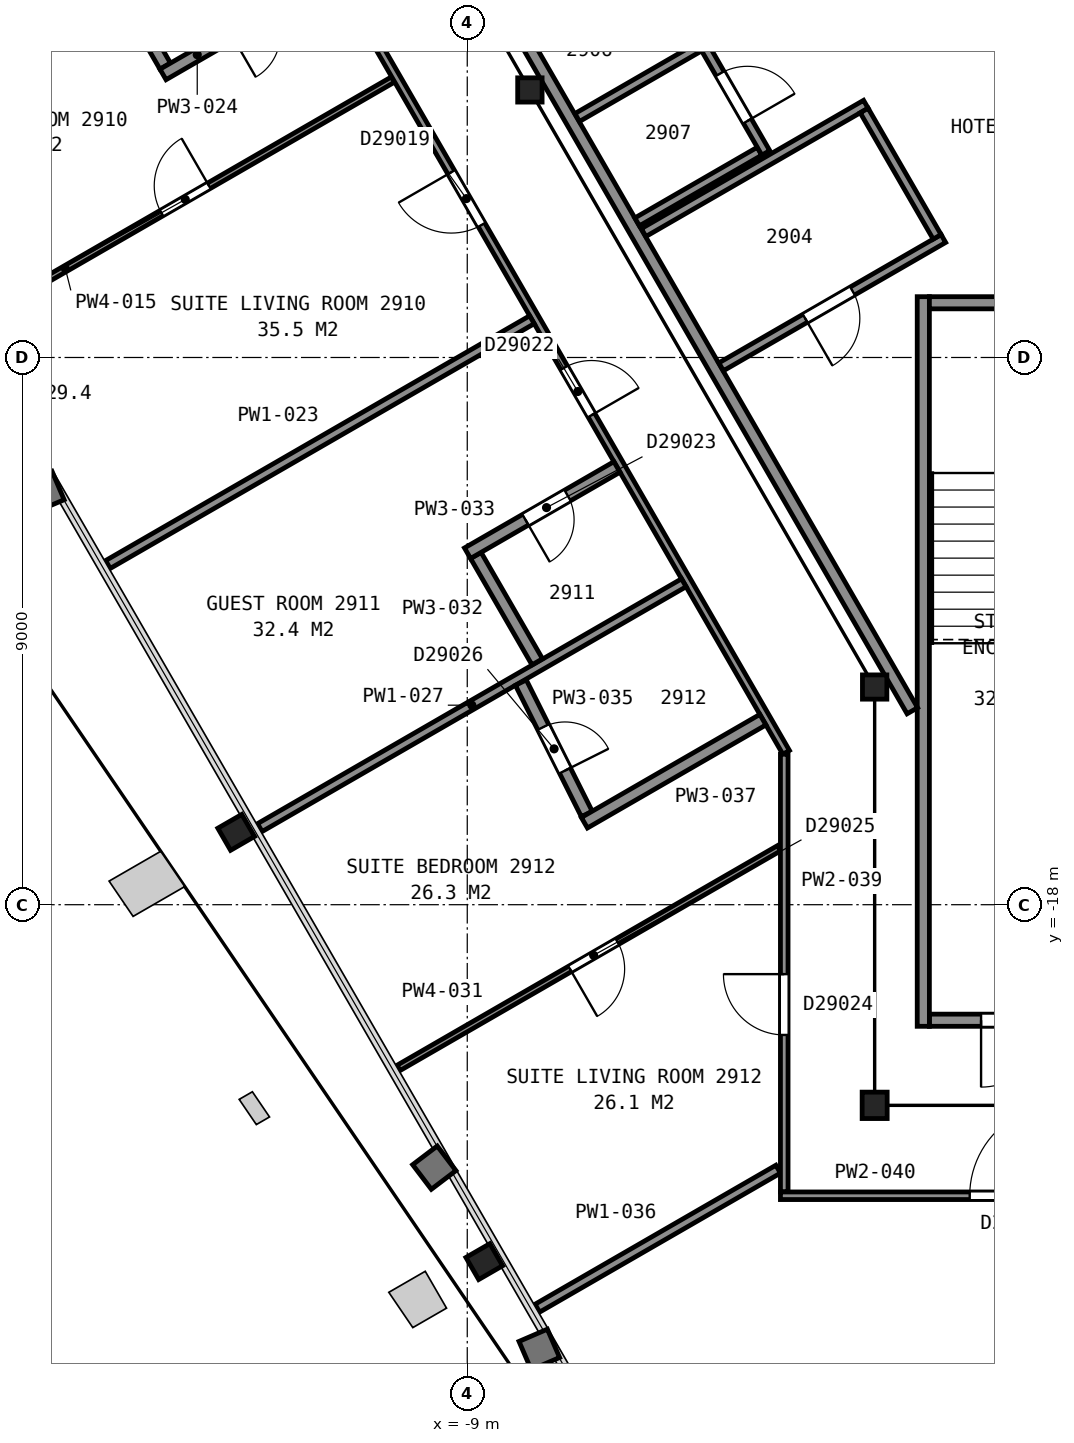
"""IFC4 building model, lengths in metres.
Left out: names, types, materials, properties, quantities, classifications, styles, units other than length and angle.
Written with IfcOpenShell. Run it as: python <this file> out.ifc"""

import sys

from ifc_helpers import new_model, si_unit, direction, frame, frame_2d, origin, origin_2d, place, context, subcontext, project, spatial, rectangle, i_section, extrude, element, fill, save


model = new_model("IFC4")
c1 = context("Model", 3, precision=1e-05, world=origin(), true_north=direction((0.0, 1.0)))
c2 = subcontext(c1, "Body", "Model", "MODEL_VIEW")
j1 = project(units=[si_unit("LENGTHUNIT", "METRE"), si_unit("PLANEANGLEUNIT", "RADIAN")], contexts=[c1])
p1 = place(None, origin())
s1 = spatial("IfcSite", under=j1, at=p1, CompositionType="ELEMENT")
p2 = place(p1, origin())
s2 = spatial("IfcBuilding", under=s1, at=p2, CompositionType="ELEMENT")
p3 = place(p2, frame((0.0, 0.0, 121.6)))
s3 = spatial("IfcBuildingStorey", under=s2, at=p3, CompositionType="ELEMENT", Elevation=121.6)
p4 = place(p3, frame((-12.8, -16.81, 0.04), z_axis=(0.0, 0.0, 1.0), x_axis=(-0.5, 0.866025403784, 0.0)))
e1 = element("IfcColumn", 1, at=p4, inside=s3, PredefinedType="COLUMN", context=c2, shape_type="SweptSolid", body=[
    extrude(i_section(OverallWidth=0.419, OverallDepth=0.455, WebThickness=0.042, FlangeThickness=0.068, FilletRadius=0.015, at=origin_2d()), origin(), (0.0, 0.0, 1.0), 3.56),
])
p5 = place(p3, frame((-8.72, -23.87, 0.045), z_axis=(0.0, 0.0, 1.0), x_axis=(-0.5, 0.866025403784, 0.0)))
e2 = element("IfcColumn", 2, at=p5, inside=s3, PredefinedType="COLUMN", context=c2, shape_type="SweptSolid", body=[
    extrude(i_section(OverallWidth=0.419, OverallDepth=0.455, WebThickness=0.042, FlangeThickness=0.068, FilletRadius=0.015, at=origin_2d()), origin(), (0.0, 0.0, 1.0), 3.555),
])
for number, where, z_axis, x_axis in (
    (3, (-7.97, -4.6, 0.0), (0.0, 0.0, 1.0), (1.0, 0.0, 0.0)),
    (4, (-2.3, -14.42, 0.0), (0.0, 0.0, 1.0), (1.0, 0.0, 0.0)),
):
    element("IfcColumn", number, at=place(p3, frame(where, z_axis=z_axis, x_axis=x_axis)), inside=s3, PredefinedType="COLUMN", context=c2, shape_type="SweptSolid", body=[
        extrude(i_section(OverallWidth=0.401, OverallDepth=0.399, WebThickness=0.025, FlangeThickness=0.04, FilletRadius=0.015, at=origin_2d()), origin(), (0.0, 0.0, 1.0), 3.6),
    ])
p6 = place(p3, frame((-2.3, -21.3, 0.0), z_axis=(0.0, 0.0, 1.0), x_axis=(-1.0, 0.0, 0.0)))
e5 = element("IfcColumn", 5, at=p6, inside=s3, PredefinedType="COLUMN", context=c2, shape_type="SweptSolid", body=[
    extrude(i_section(OverallWidth=0.411, OverallDepth=0.434, WebThickness=0.036, FlangeThickness=0.057, FilletRadius=0.015, at=origin_2d()), origin(), (0.0, 0.0, 1.0), 3.6),
])
p7 = place(p3, frame((-1.4, -19.9, 0.0), z_axis=(0.0, 0.0, 1.0), x_axis=(1.0, 0.0, 0.0)))
e6 = element("IfcWall", 6, at=p7, inside=s3, PredefinedType="PARTITIONING", context=c2, shape_type="SweptSolid", body=[
    extrude(rectangle(XDim=2.8, YDim=0.2, at=frame_2d((1.4, 0.0))), origin(), (0.0, 0.0, 1.0), 3.35),
])
p8 = place(p7, frame((0.85, 0.0, 0.0)))
e7 = element("IfcOpeningElement", 7, at=p8, cuts=e6, PredefinedType="OPENING", context=c2, shape_type="SweptSolid", body=[
    extrude(rectangle(XDim=1.1, YDim=2.1, at=frame_2d((0.55, 1.05))), frame((0.0, 0.11, 0.0), z_axis=(0.0, -1.0, 0.0), x_axis=(1.0, 0.0, 0.0)), (0.0, 0.0, 1.0), 0.22),
])
p9 = place(p3, frame((-1.5, -8.0, 0.0), z_axis=(0.0, 0.0, 1.0), x_axis=(0.0, -1.0, 0.0)))
e8 = element("IfcWall", 8, at=p9, inside=s3, PredefinedType="PARTITIONING", context=c2, shape_type="SweptSolid", body=[
    extrude(rectangle(XDim=12.0, YDim=0.2, at=frame_2d((6.0, 0.0))), origin(), (0.0, 0.0, 1.0), 3.35),
])
p10 = place(p3, frame((-1.4, -8.1, 0.0), z_axis=(0.0, 0.0, 1.0), x_axis=(1.0, 0.0, 0.0)))
e9 = element("IfcWall", 9, at=p10, inside=s3, PredefinedType="PARTITIONING", context=c2, shape_type="SweptSolid", body=[
    extrude(rectangle(XDim=2.8, YDim=0.2, at=frame_2d((1.4, 0.0))), origin(), (0.0, 0.0, 1.0), 3.35),
])
p11 = place(p3, frame((-13.664, 5.946, 0.0), z_axis=(0.0, 0.0, 1.0), x_axis=(0.499994327219, -0.866028678941, 0.0)))
e10 = element("IfcWall", 10, at=p11, inside=s3, PredefinedType="PARTITIONING", context=c2, shape_type="SweptSolid", body=[
    extrude(rectangle(XDim=23.968, YDim=0.2, at=frame_2d((11.984, 0.0))), origin(), (0.0, 0.0, 1.0), 3.35),
])
p12 = place(p3, frame((-7.192, -5.053, 0.0), z_axis=(0.0, 0.0, 1.0), x_axis=(0.865851878631, 0.500300434011, 0.0)))
e11 = element("IfcWall", 11, at=p12, inside=s3, PredefinedType="PARTITIONING", context=c2, shape_type="SweptSolid", body=[
    extrude(rectangle(XDim=2.315, YDim=0.15, at=frame_2d((1.158, 0.0))), origin(), (0.0, 0.0, 1.0), 3.35),
])
p13 = place(p3, frame((-6.206, -6.77, 0.0), z_axis=(0.0, 0.0, 1.0), x_axis=(0.865998469481, 0.500046648681, 0.0)))
e12 = element("IfcWall", 12, at=p13, inside=s3, PredefinedType="PARTITIONING", context=c2, shape_type="SweptSolid", body=[
    extrude(rectangle(XDim=2.325, YDim=0.15, at=frame_2d((1.163, 0.0))), origin(), (0.0, 0.0, 1.0), 3.35),
])
p14 = place(p3, frame((-6.1, -6.946, 0.0), z_axis=(0.0, 0.0, 1.0), x_axis=(0.866038200431, 0.499977834903, 0.0)))
e13 = element("IfcWall", 13, at=p14, inside=s3, PredefinedType="PARTITIONING", context=c2, shape_type="SweptSolid", body=[
    extrude(rectangle(XDim=4.22, YDim=0.15, at=frame_2d((2.11, 0.0))), origin(), (0.0, 0.0, 1.0), 3.35),
])
p15 = place(p3, frame((-4.091, -5.635, 0.0), z_axis=(0.0, 0.0, 1.0), x_axis=(-0.499948934428, 0.866054884499, 0.0)))
e14 = element("IfcWall", 14, at=p15, inside=s3, PredefinedType="PARTITIONING", context=c2, shape_type="SweptSolid", body=[
    extrude(rectangle(XDim=3.577, YDim=0.15, at=frame_2d((1.789, 0.0))), origin(), (0.0, 0.0, 1.0), 3.35),
])
p16 = place(p15, frame((2.377, 0.0, 0.0)))
e15 = element("IfcOpeningElement", 15, at=p16, cuts=e14, PredefinedType="OPENING", context=c2, shape_type="SweptSolid", body=[
    extrude(rectangle(XDim=0.9, YDim=2.1, at=frame_2d((0.45, 1.05))), frame((0.0, 0.085, 0.0), z_axis=(0.0, -1.0, 0.0), x_axis=(1.0, 0.0, 0.0)), (0.0, 0.0, 1.0), 0.17),
])
p17 = place(p15, frame((0.605, 0.0, 0.0)))
e16 = element("IfcOpeningElement", 16, at=p17, cuts=e14, PredefinedType="OPENING", context=c2, shape_type="SweptSolid", body=[
    extrude(rectangle(XDim=0.9, YDim=2.1, at=frame_2d((0.45, 1.05))), frame((0.0, 0.085, 0.0), z_axis=(0.0, -1.0, 0.0), x_axis=(1.0, 0.0, 0.0)), (0.0, 0.0, 1.0), 0.17),
])
p18 = place(p3, frame((-4.825, -9.154, 0.0), z_axis=(0.0, 0.0, 1.0), x_axis=(0.866023738697, 0.500002884005, 0.0)))
e17 = element("IfcWall", 17, at=p18, inside=s3, PredefinedType="PARTITIONING", context=c2, shape_type="SweptSolid", body=[
    extrude(rectangle(XDim=4.22, YDim=0.15, at=frame_2d((2.11, 0.0))), origin(), (0.0, 0.0, 1.0), 3.35),
])
p19 = place(p18, frame((1.595, 0.0, 0.0)))
e18 = element("IfcOpeningElement", 18, at=p19, cuts=e17, PredefinedType="OPENING", context=c2, shape_type="SweptSolid", body=[
    extrude(rectangle(XDim=0.9, YDim=2.1, at=frame_2d((0.45, 1.05))), frame((0.0, 0.085, 0.0), z_axis=(0.0, -1.0, 0.0), x_axis=(1.0, 0.0, 0.0)), (0.0, 0.0, 1.0), 0.17),
])
p20 = place(p3, frame((-2.472, -4.938, 0.0), z_axis=(0.0, 0.0, 1.0), x_axis=(0.500045362686, -0.865999212041, 0.0)))
e19 = element("IfcWall", 19, at=p20, inside=s3, PredefinedType="PARTITIONING", context=c2, shape_type="SweptSolid", body=[
    extrude(rectangle(XDim=2.4, YDim=0.15, at=frame_2d((1.2, 0.0))), origin(), (0.0, 0.0, 1.0), 3.35),
])
p21 = place(p3, frame((-19.473, -4.501, 0.0), z_axis=(0.0, 0.0, 1.0), x_axis=(0.866005217449, 0.50003496213, 0.0)))
e20 = element("IfcWall", 20, at=p21, inside=s3, PredefinedType="PARTITIONING", context=c2, shape_type="SweptSolid", body=[
    extrude(rectangle(XDim=8.047, YDim=0.15, at=frame_2d((4.024, 0.0))), origin(), (0.0, 0.0, 1.0), 2.613),
])
p22 = place(p3, frame((-17.192, -8.453, 0.0), z_axis=(0.0, 0.0, 1.0), x_axis=(0.865999665789, 0.500044576866, 0.0)))
e21 = element("IfcWall", 21, at=p22, inside=s3, PredefinedType="PARTITIONING", context=c2, shape_type="SweptSolid", body=[
    extrude(rectangle(XDim=8.048, YDim=0.1, at=frame_2d((4.024, 0.0))), origin(), (0.0, 0.0, 1.0), 2.613),
])
p23 = place(p22, frame((3.654, 0.0, 0.0)))
e22 = element("IfcOpeningElement", 22, at=p23, cuts=e21, PredefinedType="OPENING", context=c2, shape_type="SweptSolid", body=[
    extrude(rectangle(XDim=0.9, YDim=2.1, at=frame_2d((0.45, 1.05))), frame((0.0, 0.06, 0.0), z_axis=(0.0, -1.0, 0.0), x_axis=(1.0, 0.0, 0.0)), (0.0, 0.0, 1.0), 0.12),
])
p24 = place(p3, frame((-3.756, -15.494, 0.0), z_axis=(0.0, 0.0, 1.0), x_axis=(-0.500027787016, 0.866009360349, 0.0)))
e23 = element("IfcWall", 23, at=p24, inside=s3, PredefinedType="PARTITIONING", context=c2, shape_type="SweptSolid", body=[
    extrude(rectangle(XDim=23.856, YDim=0.125, at=frame_2d((11.928, 0.0))), origin(), (0.0, 0.0, 1.0), 2.613),
])
p25 = place(p24, frame((10.016, 0.0, 0.0)))
e24 = element("IfcOpeningElement", 24, at=p25, cuts=e23, PredefinedType="OPENING", context=c2, shape_type="SweptSolid", body=[
    extrude(rectangle(XDim=1.0, YDim=2.1, at=frame_2d((0.5, 1.05))), frame((0.0, 0.073, 0.0), z_axis=(0.0, -1.0, 0.0), x_axis=(1.0, 0.0, 0.0)), (0.0, 0.0, 1.0), 0.145),
])
p26 = place(p24, frame((6.402, 0.0, 0.0)))
e25 = element("IfcOpeningElement", 25, at=p26, cuts=e23, PredefinedType="OPENING", context=c2, shape_type="SweptSolid", body=[
    extrude(rectangle(XDim=0.9, YDim=2.1, at=frame_2d((0.45, 1.05))), frame((0.0, 0.073, 0.0), z_axis=(0.0, -1.0, 0.0), x_axis=(1.0, 0.0, 0.0)), (0.0, 0.0, 1.0), 0.145),
])
p27 = place(p3, frame((-15.177, -2.113, 0.0), z_axis=(0.0, 0.0, 1.0), x_axis=(0.500196916118, -0.865911684357, 0.0)))
e26 = element("IfcWall", 26, at=p27, inside=s3, PredefinedType="PARTITIONING", context=c2, shape_type="SweptSolid", body=[
    extrude(rectangle(XDim=2.42, YDim=0.2, at=frame_2d((1.21, 0.0))), origin(), (0.0, 0.0, 1.0), 2.613),
])
p28 = place(p3, frame((-14.91, -12.405, 0.0), z_axis=(0.0, 0.0, 1.0), x_axis=(0.866044217767, 0.499967411811, 0.0)))
e27 = element("IfcWall", 27, at=p28, inside=s3, PredefinedType="PARTITIONING", context=c2, shape_type="SweptSolid", body=[
    extrude(rectangle(XDim=8.052, YDim=0.15, at=frame_2d((4.026, 0.0))), origin(), (0.0, 0.0, 1.0), 2.613),
])
p29 = place(p3, frame((-14.004, -4.345, 0.0), z_axis=(0.0, 0.0, 1.0), x_axis=(0.866016035791, 0.500016225489, 0.0)))
e28 = element("IfcWall", 28, at=p29, inside=s3, PredefinedType="PARTITIONING", context=c2, shape_type="SweptSolid", body=[
    extrude(rectangle(XDim=3.237, YDim=0.2, at=frame_2d((1.619, 0.0))), origin(), (0.0, 0.0, 1.0), 2.613),
])
p30 = place(p29, frame((1.3, 0.0, 0.0)))
e29 = element("IfcOpeningElement", 29, at=p30, cuts=e28, PredefinedType="OPENING", context=c2, shape_type="SweptSolid", body=[
    extrude(rectangle(XDim=0.8, YDim=2.1, at=frame_2d((0.4, 1.05))), frame((0.0, 0.11, 0.0), z_axis=(0.0, -1.0, 0.0), x_axis=(1.0, 0.0, 0.0)), (0.0, 0.0, 1.0), 0.22),
])
p31 = place(p3, frame((-12.412, -16.732, 0.0), z_axis=(0.0, 0.0, 1.0), x_axis=(0.865997251595, 0.500048757853, 0.0)))
e30 = element("IfcWall", 30, at=p31, inside=s3, PredefinedType="PARTITIONING", context=c2, shape_type="SweptSolid", body=[
    extrude(rectangle(XDim=8.052, YDim=0.15, at=frame_2d((4.026, 0.0))), origin(), (0.0, 0.0, 1.0), 2.613),
])
p32 = place(p3, frame((-10.13, -20.684, 0.0), z_axis=(0.0, 0.0, 1.0), x_axis=(0.866023480589, 0.500003331057, 0.0)))
e31 = element("IfcWall", 31, at=p32, inside=s3, PredefinedType="PARTITIONING", context=c2, shape_type="SweptSolid", body=[
    extrude(rectangle(XDim=7.223, YDim=0.1, at=frame_2d((3.612, 0.0))), origin(), (0.0, 0.0, 1.0), 2.613),
])
p33 = place(p32, frame((3.254, 0.0, 0.0)))
e32 = element("IfcOpeningElement", 32, at=p33, cuts=e31, PredefinedType="OPENING", context=c2, shape_type="SweptSolid", body=[
    extrude(rectangle(XDim=0.9, YDim=2.1, at=frame_2d((0.45, 1.05))), frame((0.0, 0.06, 0.0), z_axis=(0.0, -1.0, 0.0), x_axis=(1.0, 0.0, 0.0)), (0.0, 0.0, 1.0), 0.12),
])
p34 = place(p3, frame((-8.859, -12.256, 0.0), z_axis=(0.0, 0.0, 1.0), x_axis=(0.499868889286, -0.866101087359, 0.0)))
e33 = element("IfcWall", 33, at=p34, inside=s3, PredefinedType="PARTITIONING", context=c2, shape_type="SweptSolid", body=[
    extrude(rectangle(XDim=2.021, YDim=0.2, at=frame_2d((1.01, 0.0))), origin(), (0.0, 0.0, 1.0), 2.613),
])
p35 = place(p3, frame((-6.538, -10.8, 0.0), z_axis=(0.0, 0.0, 1.0), x_axis=(-0.866048046904, -0.499960778915, 0.0)))
e34 = element("IfcWall", 34, at=p35, inside=s3, PredefinedType="PARTITIONING", context=c2, shape_type="SweptSolid", body=[
    extrude(rectangle(XDim=2.838, YDim=0.2, at=frame_2d((1.419, 0.0))), origin(), (0.0, 0.0, 1.0), 2.613),
])
p36 = place(p35, frame((0.938, 0.0, 0.0)))
e35 = element("IfcOpeningElement", 35, at=p36, cuts=e34, PredefinedType="OPENING", context=c2, shape_type="SweptSolid", body=[
    extrude(rectangle(XDim=0.8, YDim=2.1, at=frame_2d((0.4, 1.05))), frame((0.0, 0.11, 0.0), z_axis=(0.0, -1.0, 0.0), x_axis=(1.0, 0.0, 0.0)), (0.0, 0.0, 1.0), 0.22),
])
p37 = place(p3, frame((-8.119, -14.347, 0.0), z_axis=(0.0, 0.0, 1.0), x_axis=(0.448586498331, -0.893739421484, 0.0)))
e36 = element("IfcWall", 36, at=p37, inside=s3, PredefinedType="PARTITIONING", context=c2, shape_type="SweptSolid", body=[
    extrude(rectangle(XDim=2.417, YDim=0.2, at=frame_2d((1.209, 0.0))), origin(), (0.0, 0.0, 1.0), 2.613),
])
p38 = place(p37, frame((0.819, 0.0, 0.0)))
e37 = element("IfcOpeningElement", 37, at=p38, cuts=e36, PredefinedType="OPENING", context=c2, shape_type="SweptSolid", body=[
    extrude(rectangle(XDim=0.8, YDim=2.1, at=frame_2d((0.4, 1.05))), frame((0.0, 0.11, 0.0), z_axis=(0.0, -1.0, 0.0), x_axis=(1.0, 0.0, 0.0)), (0.0, 0.0, 1.0), 0.22),
])
p39 = place(p3, frame((-7.848, -24.636, 0.0), z_axis=(0.0, 0.0, 1.0), x_axis=(0.866046917185, 0.499962735845, 0.0)))
e38 = element("IfcWall", 38, at=p39, inside=s3, PredefinedType="PARTITIONING", context=c2, shape_type="SweptSolid", body=[
    extrude(rectangle(XDim=4.573, YDim=0.15, at=frame_2d((2.287, 0.0))), origin(), (0.0, 0.0, 1.0), 2.613),
])
p40 = place(p3, frame((-7.073, -16.652, 0.0), z_axis=(0.0, 0.0, 1.0), x_axis=(0.866009256036, 0.500027967679, 0.0)))
e39 = element("IfcWall", 39, at=p40, inside=s3, PredefinedType="PARTITIONING", context=c2, shape_type="SweptSolid", body=[
    extrude(rectangle(XDim=3.389, YDim=0.2, at=frame_2d((1.695, 0.0))), origin(), (0.0, 0.0, 1.0), 2.613),
])
p41 = place(p3, frame((-3.787, -22.722, 0.0), z_axis=(0.0, 0.0, 1.0), x_axis=(0.0, 1.0, 0.0)))
e40 = element("IfcWall", 40, at=p41, inside=s3, PredefinedType="PARTITIONING", context=c2, shape_type="SweptSolid", body=[
    extrude(rectangle(XDim=7.197, YDim=0.125, at=frame_2d((3.599, 0.0))), origin(), (0.0, 0.0, 1.0), 2.613),
])
p42 = place(p41, frame((2.58, 0.0, 0.0)))
e41 = element("IfcOpeningElement", 41, at=p42, cuts=e40, PredefinedType="OPENING", context=c2, shape_type="SweptSolid", body=[
    extrude(rectangle(XDim=1.0, YDim=2.1, at=frame_2d((0.5, 1.05))), frame((0.0, 0.073, 0.0), z_axis=(0.0, -1.0, 0.0), x_axis=(1.0, 0.0, 0.0)), (0.0, 0.0, 1.0), 0.145),
])
p43 = place(p3, frame((3.85, -22.787, 0.0), z_axis=(0.0, 0.0, 1.0), x_axis=(-1.0, 0.0, 0.0)))
e42 = element("IfcWall", 42, at=p43, inside=s3, PredefinedType="PARTITIONING", context=c2, shape_type="SweptSolid", body=[
    extrude(rectangle(XDim=7.699, YDim=0.125, at=frame_2d((3.85, 0.0))), origin(), (0.0, 0.0, 1.0), 2.613),
])
p44 = place(p43, frame((3.086, 0.0, 0.0)))
e43 = element("IfcOpeningElement", 43, at=p44, cuts=e42, PredefinedType="OPENING", context=c2, shape_type="SweptSolid", body=[
    extrude(rectangle(XDim=1.5, YDim=2.1, at=frame_2d((0.75, 1.05))), frame((0.0, 0.073, 0.0), z_axis=(0.0, -1.0, 0.0), x_axis=(1.0, 0.0, 0.0)), (0.0, 0.0, 1.0), 0.145),
])
p45 = place(p8, origin())
e44 = element("IfcDoor", 44, at=p45, inside=s3, OperationType="SINGLE_SWING_LEFT", PredefinedType="DOOR", context=c2, shape_type="SweptSolid", body=[
    extrude(rectangle(XDim=1.1, YDim=2.1, at=frame_2d((0.55, 1.05))), frame((0.0, 0.025, 0.0), z_axis=(0.0, -1.0, 0.0), x_axis=(1.0, 0.0, 0.0)), (0.0, 0.0, 1.0), 0.05),
])
fill(e7, e44)
p46 = place(p17, origin())
e45 = element("IfcDoor", 45, at=p46, inside=s3, OperationType="SINGLE_SWING_LEFT", PredefinedType="DOOR", context=c2, shape_type="SweptSolid", body=[
    extrude(rectangle(XDim=0.9, YDim=2.1, at=frame_2d((0.45, 1.05))), frame((0.0, 0.025, 0.0), z_axis=(0.0, -1.0, 0.0), x_axis=(1.0, 0.0, 0.0)), (0.0, 0.0, 1.0), 0.05),
])
fill(e16, e45)
p47 = place(p19, origin())
e46 = element("IfcDoor", 46, at=p47, inside=s3, OperationType="SINGLE_SWING_LEFT", PredefinedType="DOOR", context=c2, shape_type="SweptSolid", body=[
    extrude(rectangle(XDim=0.9, YDim=2.1, at=frame_2d((0.45, 1.05))), frame((0.0, 0.025, 0.0), z_axis=(0.0, -1.0, 0.0), x_axis=(1.0, 0.0, 0.0)), (0.0, 0.0, 1.0), 0.05),
])
fill(e18, e46)
p48 = place(p23, origin())
e47 = element("IfcDoor", 47, at=p48, inside=s3, OperationType="SINGLE_SWING_RIGHT", PredefinedType="DOOR", context=c2, shape_type="SweptSolid", body=[
    extrude(rectangle(XDim=0.9, YDim=2.1, at=frame_2d((0.45, 1.05))), frame((0.0, 0.025, 0.0), z_axis=(0.0, -1.0, 0.0), x_axis=(1.0, 0.0, 0.0)), (0.0, 0.0, 1.0), 0.05),
])
fill(e22, e47)
p49 = place(p25, origin())
e48 = element("IfcDoor", 48, at=p49, inside=s3, OperationType="SINGLE_SWING_RIGHT", PredefinedType="DOOR", context=c2, shape_type="SweptSolid", body=[
    extrude(rectangle(XDim=1.0, YDim=2.1, at=frame_2d((0.5, 1.05))), frame((0.0, 0.025, 0.0), z_axis=(0.0, -1.0, 0.0), x_axis=(1.0, 0.0, 0.0)), (0.0, 0.0, 1.0), 0.05),
])
fill(e24, e48)
p50 = place(p26, origin())
e49 = element("IfcDoor", 49, at=p50, inside=s3, OperationType="SINGLE_SWING_LEFT", PredefinedType="DOOR", context=c2, shape_type="SweptSolid", body=[
    extrude(rectangle(XDim=0.9, YDim=2.1, at=frame_2d((0.45, 1.05))), frame((0.0, 0.025, 0.0), z_axis=(0.0, -1.0, 0.0), x_axis=(1.0, 0.0, 0.0)), (0.0, 0.0, 1.0), 0.05),
])
fill(e25, e49)
p51 = place(p33, origin())
e50 = element("IfcDoor", 50, at=p51, inside=s3, OperationType="SINGLE_SWING_LEFT", PredefinedType="DOOR", context=c2, shape_type="SweptSolid", body=[
    extrude(rectangle(XDim=0.9, YDim=2.1, at=frame_2d((0.45, 1.05))), frame((0.0, 0.025, 0.0), z_axis=(0.0, -1.0, 0.0), x_axis=(1.0, 0.0, 0.0)), (0.0, 0.0, 1.0), 0.05),
])
fill(e32, e50)
p52 = place(p36, origin())
e51 = element("IfcDoor", 51, at=p52, inside=s3, OperationType="SINGLE_SWING_RIGHT", PredefinedType="DOOR", context=c2, shape_type="SweptSolid", body=[
    extrude(rectangle(XDim=0.8, YDim=2.1, at=frame_2d((0.4, 1.05))), frame((0.0, 0.025, 0.0), z_axis=(0.0, -1.0, 0.0), x_axis=(1.0, 0.0, 0.0)), (0.0, 0.0, 1.0), 0.05),
])
fill(e35, e51)
p53 = place(p38, origin())
e52 = element("IfcDoor", 52, at=p53, inside=s3, OperationType="SINGLE_SWING_RIGHT", PredefinedType="DOOR", context=c2, shape_type="SweptSolid", body=[
    extrude(rectangle(XDim=0.8, YDim=2.1, at=frame_2d((0.4, 1.05))), frame((0.0, 0.025, 0.0), z_axis=(0.0, -1.0, 0.0), x_axis=(1.0, 0.0, 0.0)), (0.0, 0.0, 1.0), 0.05),
])
fill(e37, e52)
p54 = place(p42, origin())
e53 = element("IfcDoor", 53, at=p54, inside=s3, OperationType="SINGLE_SWING_RIGHT", PredefinedType="DOOR", context=c2, shape_type="SweptSolid", body=[
    extrude(rectangle(XDim=1.0, YDim=2.1, at=frame_2d((0.5, 1.05))), frame((0.0, 0.025, 0.0), z_axis=(0.0, -1.0, 0.0), x_axis=(1.0, 0.0, 0.0)), (0.0, 0.0, 1.0), 0.05),
])
fill(e41, e53)
p55 = place(p44, origin())
e54 = element("IfcDoor", 54, at=p55, inside=s3, OperationType="DOUBLE_DOOR_SINGLE_SWING", PredefinedType="DOOR", context=c2, shape_type="SweptSolid", body=[
    extrude(rectangle(XDim=1.5, YDim=2.1, at=frame_2d((0.75, 1.05))), frame((0.0, 0.025, 0.0), z_axis=(0.0, -1.0, 0.0), x_axis=(1.0, 0.0, 0.0)), (0.0, 0.0, 1.0), 0.05),
])
fill(e43, e54)
save(model, sys.argv[1])
